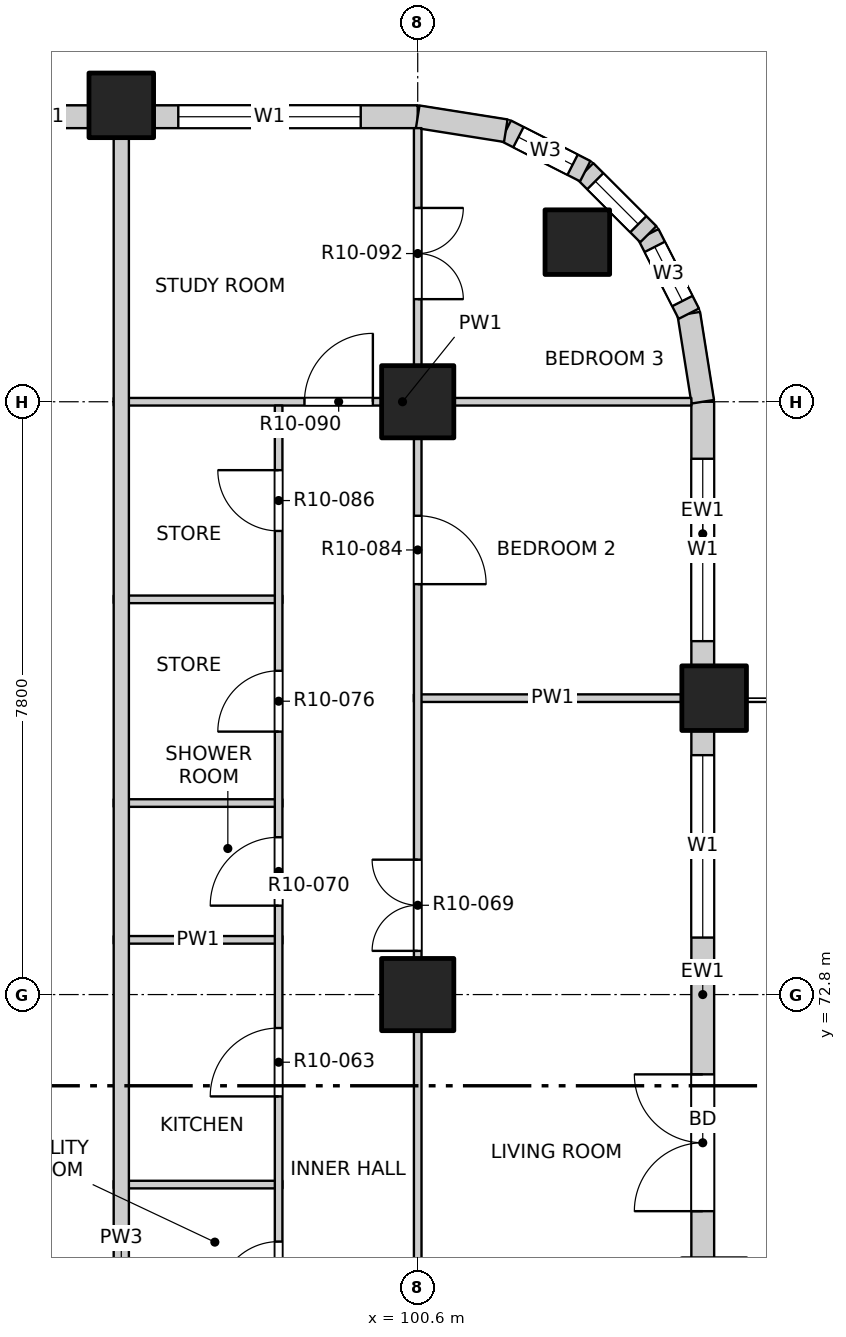
"""IFC4 building model, lengths in metres.
Left out: names, types, materials, properties, quantities, classifications, styles, units other than length and angle.
Written with IfcOpenShell. Run it as: python <this file> out.ifc"""

import sys

from ifc_helpers import new_model, si_unit, direction, frame, frame_2d, origin, origin_2d, place, context, subcontext, project, spatial, rectangle, extrude, element, fill, save


model = new_model("IFC4")
c1 = context("Model", 3, precision=1e-05, world=origin(), true_north=direction((0.0, 1.0)))
c2 = subcontext(c1, "Body", "Model", "MODEL_VIEW")
j1 = project(units=[si_unit("LENGTHUNIT", "METRE"), si_unit("PLANEANGLEUNIT", "RADIAN")], contexts=[c1])
p1 = place(None, origin())
s1 = spatial("IfcSite", under=j1, at=p1, CompositionType="ELEMENT")
p2 = place(p1, origin())
s2 = spatial("IfcBuilding", under=s1, at=p2, CompositionType="ELEMENT")
p3 = place(p2, frame((0.0, 0.0, 123.7)))
s3 = spatial("IfcBuildingStorey", under=s2, at=p3, CompositionType="ELEMENT", Elevation=123.7)
for number, where, z_axis, x_axis in (
    (1, (102.7, 82.7, -0.3), (0.0, 0.0, 1.0), (1.0, 0.0, 0.0)),
    (2, (104.5, 76.7, -0.3), (0.0, 0.0, 1.0), (1.0, 0.0, 0.0)),
    (3, (96.7, 84.5, -0.3), (0.0, 0.0, 1.0), (1.0, 0.0, 0.0)),
):
    element("IfcColumn", number, at=place(p3, frame(where, z_axis=z_axis, x_axis=x_axis)), inside=s3, PredefinedType="COLUMN", context=c2, shape_type="SweptSolid", body=[
        extrude(rectangle(XDim=0.85, YDim=0.85, at=origin_2d()), origin(), (0.0, 0.0, 1.0), 3.45),
    ])
for number, where, z_axis, x_axis in (
    (4, (100.6, 72.8, -0.3), (0.0, 0.0, 1.0), (1.0, 0.0, 0.0)),
    (5, (100.6, 80.6, -0.3), (0.0, 0.0, 1.0), (1.0, 0.0, 0.0)),
):
    element("IfcColumn", number, at=place(p3, frame(where, z_axis=z_axis, x_axis=x_axis)), inside=s3, PredefinedType="COLUMN", context=c2, shape_type="SweptSolid", body=[
        extrude(rectangle(XDim=0.95, YDim=0.95, at=origin_2d()), origin(), (0.0, 0.0, 1.0), 3.45),
    ])
p4 = place(p3, frame((104.35, 69.325, 0.0), z_axis=(0.0, 0.0, 1.0), x_axis=(0.0, 1.0, 0.0)))
e6 = element("IfcWall", 6, at=p4, inside=s3, PredefinedType="SOLIDWALL", context=c2, shape_type="SweptSolid", body=[
    extrude(rectangle(XDim=6.95, YDim=0.3, at=frame_2d((3.475, 0.0))), origin(), (0.0, 0.0, 1.0), 2.7),
])
p5 = place(p4, frame((0.625, 0.0, 0.0)))
e7 = element("IfcOpeningElement", 7, at=p5, cuts=e6, PredefinedType="OPENING", context=c2, shape_type="SweptSolid", body=[
    extrude(rectangle(XDim=1.8, YDim=2.4, at=frame_2d((0.9, 1.2))), frame((0.0, 0.16, 0.0), z_axis=(0.0, -1.0, 0.0), x_axis=(1.0, 0.0, 0.0)), (0.0, 0.0, 1.0), 0.32),
])
p6 = place(p4, frame((4.225, 0.0, 0.9)))
e8 = element("IfcOpeningElement", 8, at=p6, cuts=e6, PredefinedType="OPENING", context=c2, shape_type="SweptSolid", body=[
    extrude(rectangle(XDim=2.4, YDim=1.8, at=frame_2d((1.2, 0.9))), frame((0.0, 0.16, 0.0), z_axis=(0.0, -1.0, 0.0), x_axis=(1.0, 0.0, 0.0)), (0.0, 0.0, 1.0), 0.32),
])
p7 = place(p3, frame((104.35, 77.125, 0.0), z_axis=(0.0, 0.0, 1.0), x_axis=(0.0, 1.0, 0.0)))
e9 = element("IfcWall", 9, at=p7, inside=s3, PredefinedType="SOLIDWALL", context=c2, shape_type="SweptSolid", body=[
    extrude(rectangle(XDim=3.475, YDim=0.3, at=frame_2d((1.738, 0.0))), origin(), (0.0, 0.0, 1.0), 2.7),
])
p8 = place(p7, frame((0.325, 0.0, 0.9)))
e10 = element("IfcOpeningElement", 10, at=p8, cuts=e9, PredefinedType="OPENING", context=c2, shape_type="SweptSolid", body=[
    extrude(rectangle(XDim=2.4, YDim=1.8, at=frame_2d((1.2, 0.9))), frame((0.0, 0.16, 0.0), z_axis=(0.0, -1.0, 0.0), x_axis=(1.0, 0.0, 0.0)), (0.0, 0.0, 1.0), 0.32),
])
p9 = place(p3, frame((95.025, 84.35, 0.0), z_axis=(0.0, 0.0, 1.0), x_axis=(1.0, 0.0, 0.0)))
e11 = element("IfcWall", 11, at=p9, inside=s3, PredefinedType="SOLIDWALL", context=c2, shape_type="SweptSolid", body=[
    extrude(rectangle(XDim=1.25, YDim=0.3, at=frame_2d((0.625, 0.0))), origin(), (0.0, 0.0, 1.0), 2.7),
])
p10 = place(p3, frame((97.125, 84.35, 0.0), z_axis=(0.0, 0.0, 1.0), x_axis=(1.0, 0.0, 0.0)))
e12 = element("IfcWall", 12, at=p10, inside=s3, PredefinedType="SOLIDWALL", context=c2, shape_type="SweptSolid", body=[
    extrude(rectangle(XDim=3.475, YDim=0.3, at=frame_2d((1.738, 0.0))), origin(), (0.0, 0.0, 1.0), 2.7),
])
p11 = place(p10, frame((0.325, 0.0, 0.9)))
e13 = element("IfcOpeningElement", 13, at=p11, cuts=e12, PredefinedType="OPENING", context=c2, shape_type="SweptSolid", body=[
    extrude(rectangle(XDim=2.4, YDim=1.8, at=frame_2d((1.2, 0.9))), frame((0.0, 0.16, 0.0), z_axis=(0.0, -1.0, 0.0), x_axis=(1.0, 0.0, 0.0)), (0.0, 0.0, 1.0), 0.32),
])
p12 = place(p3, frame((104.35, 80.6, 0.0), z_axis=(0.0, 0.0, 1.0), x_axis=(-0.156496880861, 0.987678452879, 0.0)))
e14 = element("IfcWall", 14, at=p12, inside=s3, PredefinedType="SOLIDWALL", context=c2, shape_type="SweptSolid", body=[
    extrude(rectangle(XDim=1.173, YDim=0.3, at=frame_2d((0.586, 0.0))), origin(), (0.0, 0.0, 1.0), 2.7),
])
p13 = place(p3, frame((104.167, 81.759, 0.0), z_axis=(0.0, 0.0, 1.0), x_axis=(-0.454025524128, 0.890988677504, 0.0)))
e15 = element("IfcWall", 15, at=p13, inside=s3, PredefinedType="SOLIDWALL", context=c2, shape_type="SweptSolid", body=[
    extrude(rectangle(XDim=1.173, YDim=0.3, at=frame_2d((0.587, 0.0))), origin(), (0.0, 0.0, 1.0), 2.7),
])
p14 = place(p13, frame((0.187, 0.0, 0.9)))
e16 = element("IfcOpeningElement", 16, at=p14, cuts=e15, PredefinedType="OPENING", context=c2, shape_type="SweptSolid", body=[
    extrude(rectangle(XDim=0.8, YDim=1.2, at=frame_2d((0.4, 0.6))), frame((0.0, 0.16, 0.0), z_axis=(0.0, -1.0, 0.0), x_axis=(1.0, 0.0, 0.0)), (0.0, 0.0, 1.0), 0.32),
])
p15 = place(p3, frame((103.634, 82.804, 0.0), z_axis=(0.0, 0.0, 1.0), x_axis=(-0.707106781187, 0.707106781187, 0.0)))
e17 = element("IfcWall", 17, at=p15, inside=s3, PredefinedType="SOLIDWALL", context=c2, shape_type="SweptSolid", body=[
    extrude(rectangle(XDim=1.173, YDim=0.3, at=frame_2d((0.586, 0.0))), origin(), (0.0, 0.0, 1.0), 2.7),
])
p16 = place(p15, frame((0.187, 0.0, 0.9)))
e18 = element("IfcOpeningElement", 18, at=p16, cuts=e17, PredefinedType="OPENING", context=c2, shape_type="SweptSolid", body=[
    extrude(rectangle(XDim=0.8, YDim=1.2, at=frame_2d((0.4, 0.6))), frame((0.0, 0.16, 0.0), z_axis=(0.0, -1.0, 0.0), x_axis=(1.0, 0.0, 0.0)), (0.0, 0.0, 1.0), 0.32),
])
p17 = place(p3, frame((102.804, 83.634, 0.0), z_axis=(0.0, 0.0, 1.0), x_axis=(-0.890988677504, 0.454025524128, 0.0)))
e19 = element("IfcWall", 19, at=p17, inside=s3, PredefinedType="SOLIDWALL", context=c2, shape_type="SweptSolid", body=[
    extrude(rectangle(XDim=1.173, YDim=0.3, at=frame_2d((0.587, 0.0))), origin(), (0.0, 0.0, 1.0), 2.7),
])
p18 = place(p17, frame((0.187, 0.0, 0.9)))
e20 = element("IfcOpeningElement", 20, at=p18, cuts=e19, PredefinedType="OPENING", context=c2, shape_type="SweptSolid", body=[
    extrude(rectangle(XDim=0.8, YDim=1.2, at=frame_2d((0.4, 0.6))), frame((0.0, 0.16, 0.0), z_axis=(0.0, -1.0, 0.0), x_axis=(1.0, 0.0, 0.0)), (0.0, 0.0, 1.0), 0.32),
])
p19 = place(p3, frame((101.759, 84.167, 0.0), z_axis=(0.0, 0.0, 1.0), x_axis=(-0.987678452879, 0.156496880861, 0.0)))
e21 = element("IfcWall", 21, at=p19, inside=s3, PredefinedType="SOLIDWALL", context=c2, shape_type="SweptSolid", body=[
    extrude(rectangle(XDim=1.173, YDim=0.3, at=frame_2d((0.586, 0.0))), origin(), (0.0, 0.0, 1.0), 2.7),
])
for number, where, z_axis, x_axis in (
    (22, (96.6, 70.3, 0.0), (0.0, 0.0, 1.0), (1.0, 0.0, 0.0)),
    (23, (96.6, 73.52, 0.0), (0.0, 0.0, 1.0), (1.0, 0.0, 0.0)),
    (24, (96.6, 75.32, 0.0), (0.0, 0.0, 1.0), (1.0, 0.0, 0.0)),
):
    element("IfcWall", number, at=place(p3, frame(where, z_axis=z_axis, x_axis=x_axis)), inside=s3, PredefinedType="PARTITIONING", context=c2, shape_type="SweptSolid", body=[
        extrude(rectangle(XDim=2.22, YDim=0.1, at=frame_2d((1.11, 0.0))), origin(), (0.0, 0.0, 1.0), 3.15),
    ])
p20 = place(p3, frame((100.55, 76.7, 0.0), z_axis=(0.0, 0.0, 1.0), x_axis=(1.0, 0.0, 0.0)))
e25 = element("IfcWall", 25, at=p20, inside=s3, PredefinedType="PARTITIONING", context=c2, shape_type="SweptSolid", body=[
    extrude(rectangle(XDim=3.65, YDim=0.1, at=frame_2d((1.825, 0.0))), origin(), (0.0, 0.0, 1.0), 2.55),
])
p21 = place(p3, frame((96.6, 78.0, 0.0), z_axis=(0.0, 0.0, 1.0), x_axis=(1.0, 0.0, 0.0)))
e26 = element("IfcWall", 26, at=p21, inside=s3, PredefinedType="PARTITIONING", context=c2, shape_type="SweptSolid", body=[
    extrude(rectangle(XDim=2.22, YDim=0.1, at=frame_2d((1.11, 0.0))), origin(), (0.0, 0.0, 1.0), 3.15),
])
p22 = place(p3, frame((96.6, 80.6, 0.0), z_axis=(0.0, 0.0, 1.0), x_axis=(1.0, 0.0, 0.0)))
e27 = element("IfcWall", 27, at=p22, inside=s3, PredefinedType="PARTITIONING", context=c2, shape_type="SweptSolid", body=[
    extrude(rectangle(XDim=7.6, YDim=0.1, at=frame_2d((3.8, 0.0))), origin(), (0.0, 0.0, 1.0), 3.15),
])
p23 = place(p22, frame((2.51, 0.0, 0.0)))
e28 = element("IfcOpeningElement", 28, at=p23, cuts=e27, PredefinedType="OPENING", context=c2, shape_type="SweptSolid", body=[
    extrude(rectangle(XDim=0.9, YDim=2.1, at=frame_2d((0.45, 1.05))), frame((0.0, 0.06, 0.0), z_axis=(0.0, -1.0, 0.0), x_axis=(1.0, 0.0, 0.0)), (0.0, 0.0, 1.0), 0.12),
])
p24 = place(p3, frame((96.7, 53.4, 0.0), z_axis=(0.0, 0.0, 1.0), x_axis=(0.0, 1.0, 0.0)))
e29 = element("IfcWall", 29, at=p24, inside=s3, PredefinedType="PARTITIONING", context=c2, shape_type="SweptSolid", body=[
    extrude(rectangle(XDim=30.8, YDim=0.2, at=frame_2d((15.4, 0.0))), origin(), (0.0, 0.0, 1.0), 3.15),
])
p25 = place(p24, frame((9.725, 0.0, 0.0)))
e30 = element("IfcOpeningElement", 30, at=p25, cuts=e29, PredefinedType="OPENING", context=c2, shape_type="SweptSolid", body=[
    extrude(rectangle(XDim=1.0, YDim=2.1, at=frame_2d((0.5, 1.05))), frame((0.0, 0.11, 0.0), z_axis=(0.0, -1.0, 0.0), x_axis=(1.0, 0.0, 0.0)), (0.0, 0.0, 1.0), 0.22),
])
p26 = place(p24, frame((14.775, 0.0, 0.0)))
e31 = element("IfcOpeningElement", 31, at=p26, cuts=e29, PredefinedType="OPENING", context=c2, shape_type="SweptSolid", body=[
    extrude(rectangle(XDim=1.0, YDim=2.1, at=frame_2d((0.5, 1.05))), frame((0.0, 0.11, 0.0), z_axis=(0.0, -1.0, 0.0), x_axis=(1.0, 0.0, 0.0)), (0.0, 0.0, 1.0), 0.22),
])
p27 = place(p3, frame((98.77, 68.05, 0.0), z_axis=(0.0, 0.0, 1.0), x_axis=(0.0, 1.0, 0.0)))
e32 = element("IfcWall", 32, at=p27, inside=s3, PredefinedType="PARTITIONING", context=c2, shape_type="SweptSolid", body=[
    extrude(rectangle(XDim=12.5, YDim=0.1, at=frame_2d((6.25, 0.0))), origin(), (0.0, 0.0, 1.0), 3.15),
])
p28 = place(p27, frame((0.7, 0.0, 0.0)))
e33 = element("IfcOpeningElement", 33, at=p28, cuts=e32, PredefinedType="OPENING", context=c2, shape_type="SweptSolid", body=[
    extrude(rectangle(XDim=0.8, YDim=2.1, at=frame_2d((0.4, 1.05))), frame((0.0, 0.06, 0.0), z_axis=(0.0, -1.0, 0.0), x_axis=(1.0, 0.0, 0.0)), (0.0, 0.0, 1.0), 0.12),
])
p29 = place(p27, frame((3.41, 0.0, 0.0)))
e34 = element("IfcOpeningElement", 34, at=p29, cuts=e32, PredefinedType="OPENING", context=c2, shape_type="SweptSolid", body=[
    extrude(rectangle(XDim=0.9, YDim=2.1, at=frame_2d((0.45, 1.05))), frame((0.0, 0.06, 0.0), z_axis=(0.0, -1.0, 0.0), x_axis=(1.0, 0.0, 0.0)), (0.0, 0.0, 1.0), 0.12),
])
p30 = place(p27, frame((5.92, 0.0, 0.0)))
e35 = element("IfcOpeningElement", 35, at=p30, cuts=e32, PredefinedType="OPENING", context=c2, shape_type="SweptSolid", body=[
    extrude(rectangle(XDim=0.9, YDim=2.1, at=frame_2d((0.45, 1.05))), frame((0.0, 0.06, 0.0), z_axis=(0.0, -1.0, 0.0), x_axis=(1.0, 0.0, 0.0)), (0.0, 0.0, 1.0), 0.12),
])
p31 = place(p27, frame((8.21, 0.0, 0.0)))
e36 = element("IfcOpeningElement", 36, at=p31, cuts=e32, PredefinedType="OPENING", context=c2, shape_type="SweptSolid", body=[
    extrude(rectangle(XDim=0.8, YDim=2.1, at=frame_2d((0.4, 1.05))), frame((0.0, 0.06, 0.0), z_axis=(0.0, -1.0, 0.0), x_axis=(1.0, 0.0, 0.0)), (0.0, 0.0, 1.0), 0.12),
])
p32 = place(p27, frame((10.85, 0.0, 0.0)))
e37 = element("IfcOpeningElement", 37, at=p32, cuts=e32, PredefinedType="OPENING", context=c2, shape_type="SweptSolid", body=[
    extrude(rectangle(XDim=0.8, YDim=2.1, at=frame_2d((0.4, 1.05))), frame((0.0, 0.06, 0.0), z_axis=(0.0, -1.0, 0.0), x_axis=(1.0, 0.0, 0.0)), (0.0, 0.0, 1.0), 0.12),
])
p33 = place(p3, frame((100.6, 45.8, 0.0), z_axis=(0.0, 0.0, 1.0), x_axis=(0.0, 1.0, 0.0)))
e38 = element("IfcWall", 38, at=p33, inside=s3, PredefinedType="PARTITIONING", context=c2, shape_type="SweptSolid", body=[
    extrude(rectangle(XDim=38.4, YDim=0.1, at=frame_2d((19.2, 0.0))), origin(), (0.0, 0.0, 1.0), 3.15),
])
p34 = place(p33, frame((1.05, 0.0, 0.0)))
e39 = element("IfcOpeningElement", 39, at=p34, cuts=e38, PredefinedType="OPENING", context=c2, shape_type="SweptSolid", body=[
    extrude(rectangle(XDim=1.2, YDim=2.1, at=frame_2d((0.6, 1.05))), frame((0.0, 0.06, 0.0), z_axis=(0.0, -1.0, 0.0), x_axis=(1.0, 0.0, 0.0)), (0.0, 0.0, 1.0), 0.12),
])
p35 = place(p33, frame((6.9, 0.0, 0.0)))
e40 = element("IfcOpeningElement", 40, at=p35, cuts=e38, PredefinedType="OPENING", context=c2, shape_type="SweptSolid", body=[
    extrude(rectangle(XDim=1.2, YDim=2.1, at=frame_2d((0.6, 1.05))), frame((0.0, 0.06, 0.0), z_axis=(0.0, -1.0, 0.0), x_axis=(1.0, 0.0, 0.0)), (0.0, 0.0, 1.0), 0.12),
])
p36 = place(p33, frame((12.9, 0.0, 0.0)))
e41 = element("IfcOpeningElement", 41, at=p36, cuts=e38, PredefinedType="OPENING", context=c2, shape_type="SweptSolid", body=[
    extrude(rectangle(XDim=0.9, YDim=2.1, at=frame_2d((0.45, 1.05))), frame((0.0, 0.06, 0.0), z_axis=(0.0, -1.0, 0.0), x_axis=(1.0, 0.0, 0.0)), (0.0, 0.0, 1.0), 0.12),
])
p37 = place(p33, frame((16.8, 0.0, 0.0)))
e42 = element("IfcOpeningElement", 42, at=p37, cuts=e38, PredefinedType="OPENING", context=c2, shape_type="SweptSolid", body=[
    extrude(rectangle(XDim=0.9, YDim=2.1, at=frame_2d((0.45, 1.05))), frame((0.0, 0.06, 0.0), z_axis=(0.0, -1.0, 0.0), x_axis=(1.0, 0.0, 0.0)), (0.0, 0.0, 1.0), 0.12),
])
p38 = place(p33, frame((20.7, 0.0, 0.0)))
e43 = element("IfcOpeningElement", 43, at=p38, cuts=e38, PredefinedType="OPENING", context=c2, shape_type="SweptSolid", body=[
    extrude(rectangle(XDim=0.9, YDim=2.1, at=frame_2d((0.45, 1.05))), frame((0.0, 0.06, 0.0), z_axis=(0.0, -1.0, 0.0), x_axis=(1.0, 0.0, 0.0)), (0.0, 0.0, 1.0), 0.12),
])
p39 = place(p33, frame((27.575, 0.0, 0.0)))
e44 = element("IfcOpeningElement", 44, at=p39, cuts=e38, PredefinedType="OPENING", context=c2, shape_type="SweptSolid", body=[
    extrude(rectangle(XDim=1.2, YDim=2.1, at=frame_2d((0.6, 1.05))), frame((0.0, 0.06, 0.0), z_axis=(0.0, -1.0, 0.0), x_axis=(1.0, 0.0, 0.0)), (0.0, 0.0, 1.0), 0.12),
])
p40 = place(p33, frame((32.4, 0.0, 0.0)))
e45 = element("IfcOpeningElement", 45, at=p40, cuts=e38, PredefinedType="OPENING", context=c2, shape_type="SweptSolid", body=[
    extrude(rectangle(XDim=0.9, YDim=2.1, at=frame_2d((0.45, 1.05))), frame((0.0, 0.06, 0.0), z_axis=(0.0, -1.0, 0.0), x_axis=(1.0, 0.0, 0.0)), (0.0, 0.0, 1.0), 0.12),
])
p41 = place(p33, frame((36.15, 0.0, 0.0)))
e46 = element("IfcOpeningElement", 46, at=p41, cuts=e38, PredefinedType="OPENING", context=c2, shape_type="SweptSolid", body=[
    extrude(rectangle(XDim=1.2, YDim=2.1, at=frame_2d((0.6, 1.05))), frame((0.0, 0.06, 0.0), z_axis=(0.0, -1.0, 0.0), x_axis=(1.0, 0.0, 0.0)), (0.0, 0.0, 1.0), 0.12),
])
p42 = place(p5, origin())
e47 = element("IfcDoor", 47, at=p42, inside=s3, OperationType="DOUBLE_DOOR_SINGLE_SWING", PredefinedType="DOOR", context=c2, shape_type="SweptSolid", body=[
    extrude(rectangle(XDim=1.8, YDim=2.4, at=frame_2d((0.9, 1.2))), frame((0.0, 0.025, 0.0), z_axis=(0.0, -1.0, 0.0), x_axis=(1.0, 0.0, 0.0)), (0.0, 0.0, 1.0), 0.05),
])
fill(e7, e47)
p43 = place(p6, origin())
e48 = element("IfcWindow", 48, at=p43, inside=s3, PartitioningType="DOUBLE_PANEL_VERTICAL", PredefinedType="WINDOW", context=c2, shape_type="SweptSolid", body=[
    extrude(rectangle(XDim=2.4, YDim=1.8, at=frame_2d((1.2, 0.9))), frame((0.0, 0.03, 0.0), z_axis=(0.0, -1.0, 0.0), x_axis=(1.0, 0.0, 0.0)), (0.0, 0.0, 1.0), 0.06),
])
fill(e8, e48)
p44 = place(p8, origin())
e49 = element("IfcWindow", 49, at=p44, inside=s3, PartitioningType="DOUBLE_PANEL_VERTICAL", PredefinedType="WINDOW", context=c2, shape_type="SweptSolid", body=[
    extrude(rectangle(XDim=2.4, YDim=1.8, at=frame_2d((1.2, 0.9))), frame((0.0, 0.03, 0.0), z_axis=(0.0, -1.0, 0.0), x_axis=(1.0, 0.0, 0.0)), (0.0, 0.0, 1.0), 0.06),
])
fill(e10, e49)
p45 = place(p11, origin())
e50 = element("IfcWindow", 50, at=p45, inside=s3, PartitioningType="DOUBLE_PANEL_VERTICAL", PredefinedType="WINDOW", context=c2, shape_type="SweptSolid", body=[
    extrude(rectangle(XDim=2.4, YDim=1.8, at=frame_2d((1.2, 0.9))), frame((0.0, 0.03, 0.0), z_axis=(0.0, -1.0, 0.0), x_axis=(1.0, 0.0, 0.0)), (0.0, 0.0, 1.0), 0.06),
])
fill(e13, e50)
p46 = place(p14, origin())
e51 = element("IfcWindow", 51, at=p46, inside=s3, PartitioningType="SINGLE_PANEL", PredefinedType="WINDOW", context=c2, shape_type="SweptSolid", body=[
    extrude(rectangle(XDim=0.8, YDim=1.2, at=frame_2d((0.4, 0.6))), frame((0.0, 0.03, 0.0), z_axis=(0.0, -1.0, 0.0), x_axis=(1.0, 0.0, 0.0)), (0.0, 0.0, 1.0), 0.06),
])
fill(e16, e51)
p47 = place(p16, origin())
e52 = element("IfcWindow", 52, at=p47, inside=s3, PartitioningType="SINGLE_PANEL", PredefinedType="WINDOW", context=c2, shape_type="SweptSolid", body=[
    extrude(rectangle(XDim=0.8, YDim=1.2, at=frame_2d((0.4, 0.6))), frame((0.0, 0.03, 0.0), z_axis=(0.0, -1.0, 0.0), x_axis=(1.0, 0.0, 0.0)), (0.0, 0.0, 1.0), 0.06),
])
fill(e18, e52)
p48 = place(p18, origin())
e53 = element("IfcWindow", 53, at=p48, inside=s3, PartitioningType="SINGLE_PANEL", PredefinedType="WINDOW", context=c2, shape_type="SweptSolid", body=[
    extrude(rectangle(XDim=0.8, YDim=1.2, at=frame_2d((0.4, 0.6))), frame((0.0, 0.03, 0.0), z_axis=(0.0, -1.0, 0.0), x_axis=(1.0, 0.0, 0.0)), (0.0, 0.0, 1.0), 0.06),
])
fill(e20, e53)
p49 = place(p28, origin())
e54 = element("IfcDoor", 54, at=p49, inside=s3, OperationType="SINGLE_SWING_LEFT", PredefinedType="DOOR", context=c2, shape_type="SweptSolid", body=[
    extrude(rectangle(XDim=0.8, YDim=2.1, at=frame_2d((0.4, 1.05))), frame((0.0, 0.025, 0.0), z_axis=(0.0, -1.0, 0.0), x_axis=(1.0, 0.0, 0.0)), (0.0, 0.0, 1.0), 0.05),
])
fill(e33, e54)
p50 = place(p29, origin())
e55 = element("IfcDoor", 55, at=p50, inside=s3, OperationType="SINGLE_SWING_LEFT", PredefinedType="DOOR", context=c2, shape_type="SweptSolid", body=[
    extrude(rectangle(XDim=0.9, YDim=2.1, at=frame_2d((0.45, 1.05))), frame((0.0, 0.025, 0.0), z_axis=(0.0, -1.0, 0.0), x_axis=(1.0, 0.0, 0.0)), (0.0, 0.0, 1.0), 0.05),
])
fill(e34, e55)
p51 = place(p39, origin())
e56 = element("IfcDoor", 56, at=p51, inside=s3, OperationType="DOUBLE_DOOR_SINGLE_SWING", PredefinedType="DOOR", context=c2, shape_type="SweptSolid", body=[
    extrude(rectangle(XDim=1.2, YDim=2.1, at=frame_2d((0.6, 1.05))), frame((0.0, 0.025, 0.0), z_axis=(0.0, -1.0, 0.0), x_axis=(1.0, 0.0, 0.0)), (0.0, 0.0, 1.0), 0.05),
])
fill(e44, e56)
p52 = place(p30, origin())
e57 = element("IfcDoor", 57, at=p52, inside=s3, OperationType="SINGLE_SWING_LEFT", PredefinedType="DOOR", context=c2, shape_type="SweptSolid", body=[
    extrude(rectangle(XDim=0.9, YDim=2.1, at=frame_2d((0.45, 1.05))), frame((0.0, 0.025, 0.0), z_axis=(0.0, -1.0, 0.0), x_axis=(1.0, 0.0, 0.0)), (0.0, 0.0, 1.0), 0.05),
])
fill(e35, e57)
p53 = place(p31, origin())
e58 = element("IfcDoor", 58, at=p53, inside=s3, OperationType="SINGLE_SWING_LEFT", PredefinedType="DOOR", context=c2, shape_type="SweptSolid", body=[
    extrude(rectangle(XDim=0.8, YDim=2.1, at=frame_2d((0.4, 1.05))), frame((0.0, 0.025, 0.0), z_axis=(0.0, -1.0, 0.0), x_axis=(1.0, 0.0, 0.0)), (0.0, 0.0, 1.0), 0.05),
])
fill(e36, e58)
p54 = place(p40, origin())
e59 = element("IfcDoor", 59, at=p54, inside=s3, OperationType="SINGLE_SWING_RIGHT", PredefinedType="DOOR", context=c2, shape_type="SweptSolid", body=[
    extrude(rectangle(XDim=0.9, YDim=2.1, at=frame_2d((0.45, 1.05))), frame((0.0, 0.025, 0.0), z_axis=(0.0, -1.0, 0.0), x_axis=(1.0, 0.0, 0.0)), (0.0, 0.0, 1.0), 0.05),
])
fill(e45, e59)
p55 = place(p32, origin())
e60 = element("IfcDoor", 60, at=p55, inside=s3, OperationType="SINGLE_SWING_RIGHT", PredefinedType="DOOR", context=c2, shape_type="SweptSolid", body=[
    extrude(rectangle(XDim=0.8, YDim=2.1, at=frame_2d((0.4, 1.05))), frame((0.0, 0.025, 0.0), z_axis=(0.0, -1.0, 0.0), x_axis=(1.0, 0.0, 0.0)), (0.0, 0.0, 1.0), 0.05),
])
fill(e37, e60)
p56 = place(p23, origin())
e61 = element("IfcDoor", 61, at=p56, inside=s3, OperationType="SINGLE_SWING_RIGHT", PredefinedType="DOOR", context=c2, shape_type="SweptSolid", body=[
    extrude(rectangle(XDim=0.9, YDim=2.1, at=frame_2d((0.45, 1.05))), frame((0.0, 0.025, 0.0), z_axis=(0.0, -1.0, 0.0), x_axis=(1.0, 0.0, 0.0)), (0.0, 0.0, 1.0), 0.05),
])
fill(e28, e61)
p57 = place(p41, origin())
e62 = element("IfcDoor", 62, at=p57, inside=s3, OperationType="DOUBLE_DOOR_SINGLE_SWING", PredefinedType="DOOR", context=c2, shape_type="SweptSolid", body=[
    extrude(rectangle(XDim=1.2, YDim=2.1, at=frame_2d((0.6, 1.05))), frame((0.0, 0.025, 0.0), z_axis=(0.0, -1.0, 0.0), x_axis=(1.0, 0.0, 0.0)), (0.0, 0.0, 1.0), 0.05),
])
fill(e46, e62)
save(model, sys.argv[1])
